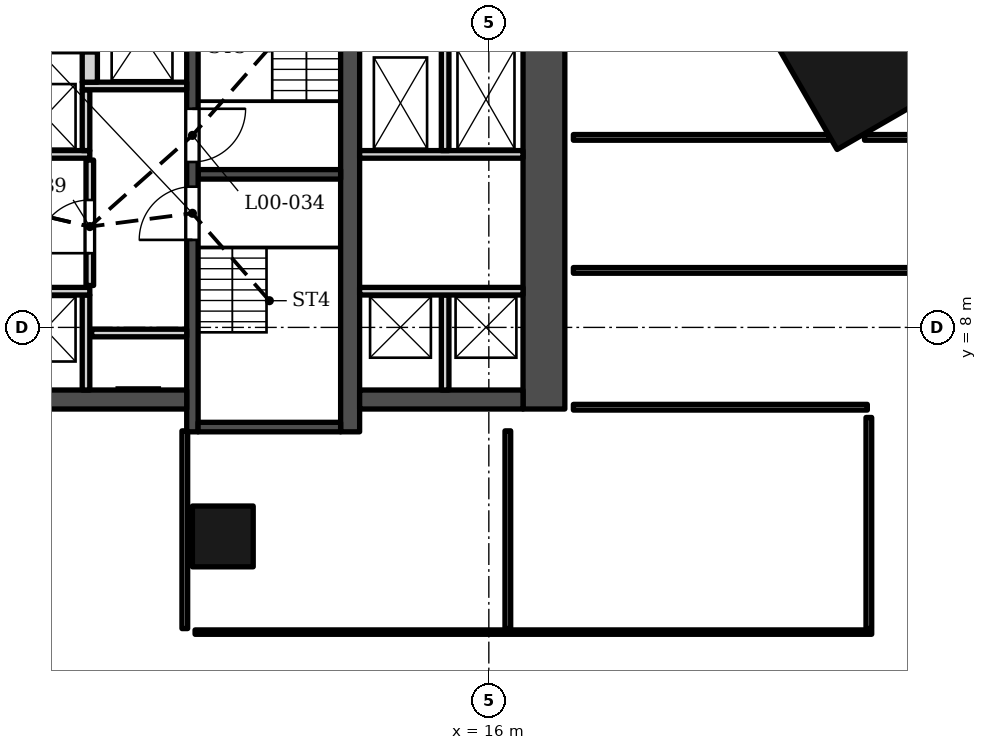
"""IFC4 building model, lengths in metres.
Left out: names, types, materials, properties, quantities, classifications, styles, units other than length and angle.
Written with IfcOpenShell. Run it as: python <this file> out.ifc"""

import sys

from ifc_helpers import new_model, si_unit, direction, frame, frame_2d, origin, origin_2d, place, context, subcontext, project, spatial, rectangle, extrude, element, fill, save


model = new_model("IFC4")
c1 = context("Model", 3, precision=1e-05, world=origin(), true_north=direction((0.0, 1.0)))
c2 = subcontext(c1, "Body", "Model", "MODEL_VIEW")
j1 = project(units=[si_unit("LENGTHUNIT", "METRE"), si_unit("PLANEANGLEUNIT", "RADIAN")], contexts=[c1])
p1 = place(None, origin())
s1 = spatial("IfcSite", under=j1, at=p1, CompositionType="ELEMENT")
p2 = place(p1, origin())
s2 = spatial("IfcBuilding", under=s1, at=p2, CompositionType="ELEMENT")
p3 = place(p2, origin())
s3 = spatial("IfcBuildingStorey", under=s2, at=p3, CompositionType="ELEMENT", Elevation=0.0)
p4 = place(p3, frame((25.75, 14.867, 0.0), z_axis=(0.0, 0.0, 1.0), x_axis=(-0.866025386331, -0.50000003023, 0.0)))
e1 = element("IfcColumn", 1, at=p4, inside=s3, PredefinedType="COLUMN", context=c2, shape_type="SweptSolid", body=[
    extrude(rectangle(XDim=3.2, YDim=3.2, at=origin_2d()), origin(), (0.0, 0.0, 1.0), 9.0),
])
p5 = place(p3, frame((9.0, 2.5, 0.0), z_axis=(0.0, 0.0, 1.0), x_axis=(1.0, 0.0, 0.0)))
e2 = element("IfcColumn", 2, at=p5, inside=s3, PredefinedType="COLUMN", context=c2, shape_type="SweptSolid", body=[
    extrude(rectangle(XDim=1.6, YDim=1.6, at=origin_2d()), origin(), (0.0, 0.0, 1.0), 9.0),
])
p6 = place(p3, frame((12.35, 5.253, 0.0), z_axis=(0.0, 0.0, 1.0), x_axis=(0.0, 1.0, 0.0)))
e3 = element("IfcWall", 3, at=p6, inside=s3, PredefinedType="SHEAR", context=c2, shape_type="SweptSolid", body=[
    extrude(rectangle(XDim=13.3, YDim=0.5, at=frame_2d((6.65, 0.0))), origin(), (0.0, 0.0, 1.0), 9.0),
])
p7 = place(p3, frame((8.2, 5.253, 0.0), z_axis=(0.0, 0.0, 1.0), x_axis=(0.0, 1.0, 0.0)))
e4 = element("IfcWall", 4, at=p7, inside=s3, PredefinedType="SHEAR", context=c2, shape_type="SweptSolid", body=[
    extrude(rectangle(XDim=13.3, YDim=0.3, at=frame_2d((6.65, 0.0))), origin(), (0.0, 0.0, 1.0), 9.0),
])
p8 = place(p7, frame((7.1, 0.0, 0.0)))
e5 = element("IfcOpeningElement", 5, at=p8, cuts=e4, PredefinedType="OPENING", context=c2, shape_type="SweptSolid", body=[
    extrude(rectangle(XDim=1.4, YDim=2.1, at=frame_2d((0.7, 1.05))), frame((0.0, 0.16, 0.0), z_axis=(0.0, -1.0, 0.0), x_axis=(1.0, 0.0, 0.0)), (0.0, 0.0, 1.0), 0.32),
])
p9 = place(p7, frame((5.05, 0.0, 0.0)))
e6 = element("IfcOpeningElement", 6, at=p9, cuts=e4, PredefinedType="OPENING", context=c2, shape_type="SweptSolid", body=[
    extrude(rectangle(XDim=1.4, YDim=2.1, at=frame_2d((0.7, 1.05))), frame((0.0, 0.16, 0.0), z_axis=(0.0, -1.0, 0.0), x_axis=(1.0, 0.0, 0.0)), (0.0, 0.0, 1.0), 0.32),
])
for number, where, z_axis, x_axis in (
    (7, (8.35, 12.028, 0.0), (0.0, 0.0, 1.0), (1.0, 0.0, 0.0)),
    (8, (8.35, 5.378, 0.0), (0.0, 0.0, 1.0), (1.0, 0.0, 0.0)),
):
    element("IfcWall", number, at=place(p3, frame(where, z_axis=z_axis, x_axis=x_axis)), inside=s3, PredefinedType="SHEAR", context=c2, shape_type="SweptSolid", body=[
        extrude(rectangle(XDim=3.75, YDim=0.25, at=frame_2d((1.875, 0.0))), origin(), (0.0, 0.0, 1.0), 9.0),
    ])
p10 = place(p3, frame((1.0, 6.103, 0.0), z_axis=(0.0, 0.0, 1.0), x_axis=(1.0, 0.0, 0.0)))
e9 = element("IfcWall", 9, at=p10, inside=s3, PredefinedType="SHEAR", context=c2, shape_type="SweptSolid", body=[
    extrude(rectangle(XDim=7.05, YDim=0.5, at=frame_2d((3.525, 0.0))), origin(), (0.0, 0.0, 1.0), 9.0),
])
p11 = place(p10, frame((5.325, 0.0, 0.0)))
e10 = element("IfcOpeningElement", 10, at=p11, cuts=e9, PredefinedType="OPENING", context=c2, shape_type="SweptSolid", body=[
    extrude(rectangle(XDim=0.9, YDim=2.1, at=frame_2d((0.45, 1.05))), frame((0.0, 0.26, 0.0), z_axis=(0.0, -1.0, 0.0), x_axis=(1.0, 0.0, 0.0)), (0.0, 0.0, 1.0), 0.52),
])
p12 = place(p3, frame((12.6, 6.103, 0.0), z_axis=(0.0, 0.0, 1.0), x_axis=(1.0, 0.0, 0.0)))
e11 = element("IfcWall", 11, at=p12, inside=s3, PredefinedType="SHEAR", context=c2, shape_type="SweptSolid", body=[
    extrude(rectangle(XDim=4.3, YDim=0.5, at=frame_2d((2.15, 0.0))), origin(), (0.0, 0.0, 1.0), 9.0),
])
p13 = place(p3, frame((17.45, 5.853, 0.0), z_axis=(0.0, 0.0, 1.0), x_axis=(0.0, 1.0, 0.0)))
e12 = element("IfcWall", 12, at=p13, inside=s3, PredefinedType="SHEAR", context=c2, shape_type="SweptSolid", body=[
    extrude(rectangle(XDim=13.2, YDim=1.1, at=frame_2d((6.6, 0.0))), origin(), (0.0, 0.0, 1.0), 9.0),
])
p14 = place(p13, frame((4.1, 0.0, 0.0)))
e13 = element("IfcOpeningElement", 13, at=p14, cuts=e12, PredefinedType="OPENING", context=c2, shape_type="SweptSolid", body=[
    extrude(rectangle(XDim=1.6, YDim=2.1, at=frame_2d((0.8, 1.05))), frame((0.0, 0.56, 0.0), z_axis=(0.0, -1.0, 0.0), x_axis=(1.0, 0.0, 0.0)), (0.0, 0.0, 1.0), 1.12),
])
p15 = place(p13, frame((10.15, 0.0, 0.0)))
e14 = element("IfcOpeningElement", 14, at=p15, cuts=e12, PredefinedType="OPENING", context=c2, shape_type="SweptSolid", body=[
    extrude(rectangle(XDim=0.9, YDim=2.1, at=frame_2d((0.45, 1.05))), frame((0.0, 0.56, 0.0), z_axis=(0.0, -1.0, 0.0), x_axis=(1.0, 0.0, 0.0)), (0.0, 0.0, 1.0), 1.12),
])
for number, where, z_axis, x_axis in (
    (15, (5.4, 6.353, 0.0), (0.0, 0.0, 1.0), (0.0, 1.0, 0.0)),
    (16, (14.85, 6.353, 0.0), (0.0, 0.0, 1.0), (0.0, 1.0, 0.0)),
    (17, (5.55, 7.853, 0.0), (0.0, 0.0, 1.0), (1.0, 0.0, 0.0)),
):
    element("IfcWall", number, at=place(p3, frame(where, z_axis=z_axis, x_axis=x_axis)), inside=s3, PredefinedType="SOLIDWALL", context=c2, shape_type="SweptSolid", body=[
        extrude(rectangle(XDim=2.5, YDim=0.2, at=frame_2d((1.25, 0.0))), origin(), (0.0, 0.0, 1.0), 8.5),
    ])
p16 = place(p3, frame((1.0, 8.953, 0.0), z_axis=(0.0, 0.0, 1.0), x_axis=(1.0, 0.0, 0.0)))
e18 = element("IfcWall", 18, at=p16, inside=s3, PredefinedType="SOLIDWALL", context=c2, shape_type="SweptSolid", body=[
    extrude(rectangle(XDim=4.5, YDim=0.2, at=frame_2d((2.25, 0.0))), origin(), (0.0, 0.0, 1.0), 8.5),
])
p17 = place(p16, frame((0.625, 0.0, 0.0)))
e19 = element("IfcOpeningElement", 19, at=p17, cuts=e18, PredefinedType="OPENING", context=c2, shape_type="SweptSolid", body=[
    extrude(rectangle(XDim=1.1, YDim=2.1, at=frame_2d((0.55, 1.05))), frame((0.0, 0.11, 0.0), z_axis=(0.0, -1.0, 0.0), x_axis=(1.0, 0.0, 0.0)), (0.0, 0.0, 1.0), 0.22),
])
p18 = place(p16, frame((2.775, 0.0, 0.0)))
e20 = element("IfcOpeningElement", 20, at=p18, cuts=e18, PredefinedType="OPENING", context=c2, shape_type="SweptSolid", body=[
    extrude(rectangle(XDim=1.1, YDim=2.1, at=frame_2d((0.55, 1.05))), frame((0.0, 0.11, 0.0), z_axis=(0.0, -1.0, 0.0), x_axis=(1.0, 0.0, 0.0)), (0.0, 0.0, 1.0), 0.22),
])
p19 = place(p3, frame((12.6, 8.953, 0.0), z_axis=(0.0, 0.0, 1.0), x_axis=(1.0, 0.0, 0.0)))
e21 = element("IfcWall", 21, at=p19, inside=s3, PredefinedType="SOLIDWALL", context=c2, shape_type="SweptSolid", body=[
    extrude(rectangle(XDim=4.3, YDim=0.2, at=frame_2d((2.15, 0.0))), origin(), (0.0, 0.0, 1.0), 8.5),
])
p20 = place(p19, frame((0.525, 0.0, 0.0)))
e22 = element("IfcOpeningElement", 22, at=p20, cuts=e21, PredefinedType="OPENING", context=c2, shape_type="SweptSolid", body=[
    extrude(rectangle(XDim=1.1, YDim=2.1, at=frame_2d((0.55, 1.05))), frame((0.0, 0.11, 0.0), z_axis=(0.0, -1.0, 0.0), x_axis=(1.0, 0.0, 0.0)), (0.0, 0.0, 1.0), 0.22),
])
p21 = place(p19, frame((2.775, 0.0, 0.0)))
e23 = element("IfcOpeningElement", 23, at=p21, cuts=e21, PredefinedType="OPENING", context=c2, shape_type="SweptSolid", body=[
    extrude(rectangle(XDim=1.1, YDim=2.1, at=frame_2d((0.55, 1.05))), frame((0.0, 0.11, 0.0), z_axis=(0.0, -1.0, 0.0), x_axis=(1.0, 0.0, 0.0)), (0.0, 0.0, 1.0), 0.22),
])
p22 = place(p3, frame((5.5, 9.103, 0.0), z_axis=(0.0, 0.0, 1.0), x_axis=(0.0, 1.0, 0.0)))
e24 = element("IfcWall", 24, at=p22, inside=s3, PredefinedType="SOLIDWALL", context=c2, shape_type="SweptSolid", body=[
    extrude(rectangle(XDim=3.3, YDim=0.2, at=frame_2d((1.65, 0.0))), origin(), (0.0, 0.0, 1.0), 8.5),
])
p23 = place(p22, frame((0.85, 0.0, 0.0)))
e25 = element("IfcOpeningElement", 25, at=p23, cuts=e24, PredefinedType="OPENING", context=c2, shape_type="SweptSolid", body=[
    extrude(rectangle(XDim=1.4, YDim=2.1, at=frame_2d((0.7, 1.05))), frame((0.0, 0.11, 0.0), z_axis=(0.0, -1.0, 0.0), x_axis=(1.0, 0.0, 0.0)), (0.0, 0.0, 1.0), 0.22),
])
p24 = place(p3, frame((-1.5, 12.552, 0.0), z_axis=(0.0, 0.0, 1.0), x_axis=(1.0, 0.0, 0.0)))
e26 = element("IfcWall", 26, at=p24, inside=s3, PredefinedType="SOLIDWALL", context=c2, shape_type="SweptSolid", body=[
    extrude(rectangle(XDim=7.0, YDim=0.2, at=frame_2d((3.5, 0.0))), origin(), (0.0, 0.0, 1.0), 8.5),
])
p25 = place(p24, frame((0.6, 0.0, 0.0)))
e27 = element("IfcOpeningElement", 27, at=p25, cuts=e26, PredefinedType="OPENING", context=c2, shape_type="SweptSolid", body=[
    extrude(rectangle(XDim=1.4, YDim=2.4, at=frame_2d((0.7, 1.2))), frame((0.0, 0.11, 0.0), z_axis=(0.0, -1.0, 0.0), x_axis=(1.0, 0.0, 0.0)), (0.0, 0.0, 1.0), 0.22),
])
p26 = place(p24, frame((3.075, 0.0, 0.0)))
e28 = element("IfcOpeningElement", 28, at=p26, cuts=e26, PredefinedType="OPENING", context=c2, shape_type="SweptSolid", body=[
    extrude(rectangle(XDim=1.1, YDim=2.1, at=frame_2d((0.55, 1.05))), frame((0.0, 0.11, 0.0), z_axis=(0.0, -1.0, 0.0), x_axis=(1.0, 0.0, 0.0)), (0.0, 0.0, 1.0), 0.22),
])
p27 = place(p24, frame((5.275, 0.0, 0.0)))
e29 = element("IfcOpeningElement", 29, at=p27, cuts=e26, PredefinedType="OPENING", context=c2, shape_type="SweptSolid", body=[
    extrude(rectangle(XDim=1.1, YDim=2.1, at=frame_2d((0.55, 1.05))), frame((0.0, 0.11, 0.0), z_axis=(0.0, -1.0, 0.0), x_axis=(1.0, 0.0, 0.0)), (0.0, 0.0, 1.0), 0.22),
])
p28 = place(p3, frame((12.6, 12.552, 0.0), z_axis=(0.0, 0.0, 1.0), x_axis=(1.0, 0.0, 0.0)))
e30 = element("IfcWall", 30, at=p28, inside=s3, PredefinedType="SOLIDWALL", context=c2, shape_type="SweptSolid", body=[
    extrude(rectangle(XDim=4.3, YDim=0.2, at=frame_2d((2.15, 0.0))), origin(), (0.0, 0.0, 1.0), 8.5),
])
p29 = place(p28, frame((0.475, 0.0, 0.0)))
e31 = element("IfcOpeningElement", 31, at=p29, cuts=e30, PredefinedType="OPENING", context=c2, shape_type="SweptSolid", body=[
    extrude(rectangle(XDim=1.2, YDim=2.1, at=frame_2d((0.6, 1.05))), frame((0.0, 0.11, 0.0), z_axis=(0.0, -1.0, 0.0), x_axis=(1.0, 0.0, 0.0)), (0.0, 0.0, 1.0), 0.22),
])
p30 = place(p28, frame((2.625, 0.0, 0.0)))
e32 = element("IfcOpeningElement", 32, at=p30, cuts=e30, PredefinedType="OPENING", context=c2, shape_type="SweptSolid", body=[
    extrude(rectangle(XDim=1.4, YDim=2.1, at=frame_2d((0.7, 1.05))), frame((0.0, 0.11, 0.0), z_axis=(0.0, -1.0, 0.0), x_axis=(1.0, 0.0, 0.0)), (0.0, 0.0, 1.0), 0.22),
])
p31 = place(p3, frame((5.4, 12.653, 0.0), z_axis=(0.0, 0.0, 1.0), x_axis=(0.0, 1.0, 0.0)))
e33 = element("IfcWall", 33, at=p31, inside=s3, PredefinedType="SOLIDWALL", context=c2, shape_type="SweptSolid", body=[
    extrude(rectangle(XDim=1.6, YDim=0.2, at=frame_2d((0.8, 0.0))), origin(), (0.0, 0.0, 1.0), 8.5),
])
p32 = place(p3, frame((14.85, 12.653, 0.0), z_axis=(0.0, 0.0, 1.0), x_axis=(0.0, 1.0, 0.0)))
e34 = element("IfcWall", 34, at=p32, inside=s3, PredefinedType="SOLIDWALL", context=c2, shape_type="SweptSolid", body=[
    extrude(rectangle(XDim=3.0, YDim=0.2, at=frame_2d((1.5, 0.0))), origin(), (0.0, 0.0, 1.0), 8.5),
])
p33 = place(p3, frame((5.3, 14.353, 0.0), z_axis=(0.0, 0.0, 1.0), x_axis=(1.0, 0.0, 0.0)))
e35 = element("IfcWall", 35, at=p33, inside=s3, PredefinedType="SOLIDWALL", context=c2, shape_type="SweptSolid", body=[
    extrude(rectangle(XDim=2.75, YDim=0.2, at=frame_2d((1.375, 0.0))), origin(), (0.0, 0.0, 1.0), 8.5),
])
p34 = place(p33, frame((0.975, 0.0, 0.0)))
e36 = element("IfcOpeningElement", 36, at=p34, cuts=e35, PredefinedType="OPENING", context=c2, shape_type="SweptSolid", body=[
    extrude(rectangle(XDim=1.2, YDim=2.1, at=frame_2d((0.6, 1.05))), frame((0.0, 0.11, 0.0), z_axis=(0.0, -1.0, 0.0), x_axis=(1.0, 0.0, 0.0)), (0.0, 0.0, 1.0), 0.22),
])
p35 = place(p3, frame((5.5, 14.453, 0.0), z_axis=(0.0, 0.0, 1.0), x_axis=(0.0, 1.0, 0.0)))
e37 = element("IfcWall", 37, at=p35, inside=s3, PredefinedType="SOLIDWALL", context=c2, shape_type="SweptSolid", body=[
    extrude(rectangle(XDim=0.8, YDim=0.4, at=frame_2d((0.4, 0.0))), origin(), (0.0, 0.0, 1.0), 8.5),
])
p36 = place(p3, frame((-1.5, 15.353, 0.0), z_axis=(0.0, 0.0, 1.0), x_axis=(1.0, 0.0, 0.0)))
e38 = element("IfcWall", 38, at=p36, inside=s3, PredefinedType="SOLIDWALL", context=c2, shape_type="SweptSolid", body=[
    extrude(rectangle(XDim=7.2, YDim=0.2, at=frame_2d((3.6, 0.0))), origin(), (0.0, 0.0, 1.0), 8.5),
])
p37 = place(p3, frame((8.27, -0.018, 0.0), z_axis=(0.0, 0.0, 1.0), x_axis=(1.0, 0.0, 0.0)))
e39 = element("IfcWall", 39, at=p37, inside=s3, PredefinedType="PARTITIONING", context=c2, shape_type="SweptSolid", body=[
    extrude(rectangle(XDim=17.805, YDim=0.115, at=frame_2d((8.902, 0.0))), origin(), (0.0, 0.0, 1.0), 7.3),
])
p38 = place(p37, frame((3.33, 0.0, 0.0)))
e40 = element("IfcOpeningElement", 40, at=p38, cuts=e39, PredefinedType="OPENING", context=c2, shape_type="SweptSolid", body=[
    extrude(rectangle(XDim=1.1, YDim=2.1, at=frame_2d((0.55, 1.05))), frame((0.0, 0.067, 0.0), z_axis=(0.0, -1.0, 0.0), x_axis=(1.0, 0.0, 0.0)), (0.0, 0.0, 1.0), 0.135),
])
p39 = place(p37, frame((12.58, 0.0, 0.0)))
e41 = element("IfcOpeningElement", 41, at=p39, cuts=e39, PredefinedType="OPENING", context=c2, shape_type="SweptSolid", body=[
    extrude(rectangle(XDim=1.0, YDim=2.1, at=frame_2d((0.5, 1.05))), frame((0.0, 0.067, 0.0), z_axis=(0.0, -1.0, 0.0), x_axis=(1.0, 0.0, 0.0)), (0.0, 0.0, 1.0), 0.135),
])
for number, where, z_axis, x_axis in (
    (42, (8.0, 0.075, 0.0), (0.0, 0.0, 1.0), (0.0, 1.0, 0.0)),
    (43, (16.5, 0.075, 0.0), (0.0, 0.0, 1.0), (0.0, 1.0, 0.0)),
):
    element("IfcWall", number, at=place(p3, frame(where, z_axis=z_axis, x_axis=x_axis)), inside=s3, PredefinedType="PARTITIONING", context=c2, shape_type="SweptSolid", body=[
        extrude(rectangle(XDim=5.203, YDim=0.15, at=frame_2d((2.602, 0.0))), origin(), (0.0, 0.0, 1.0), 8.5),
    ])
p40 = place(p3, frame((26.0, 0.075, 0.0), z_axis=(0.0, 0.0, 1.0), x_axis=(0.0, 1.0, 0.0)))
e44 = element("IfcWall", 44, at=p40, inside=s3, PredefinedType="PARTITIONING", context=c2, shape_type="SweptSolid", body=[
    extrude(rectangle(XDim=5.555, YDim=0.15, at=frame_2d((2.777, 0.0))), origin(), (0.0, 0.0, 1.0), 8.5),
])
p41 = place(p3, frame((18.225, 5.9, 0.0), z_axis=(0.0, 0.0, 1.0), x_axis=(1.0, 0.0, 0.0)))
e45 = element("IfcWall", 45, at=p41, inside=s3, PredefinedType="PARTITIONING", context=c2, shape_type="SweptSolid", body=[
    extrude(rectangle(XDim=7.735, YDim=0.15, at=frame_2d((3.867, 0.0))), origin(), (0.0, 0.0, 1.0), 7.6),
])
p42 = place(p3, frame((18.225, 9.5, 0.0), z_axis=(0.0, 0.0, 1.0), x_axis=(1.0, 0.0, 0.0)))
e46 = element("IfcWall", 46, at=p42, inside=s3, PredefinedType="PARTITIONING", context=c2, shape_type="SweptSolid", body=[
    extrude(rectangle(XDim=15.3, YDim=0.15, at=frame_2d((7.65, 0.0))), origin(), (0.0, 0.0, 1.0), 7.3),
])
p43 = place(p3, frame((18.225, 13.0, 0.0), z_axis=(0.0, 0.0, 1.0), x_axis=(1.0, 0.0, 0.0)))
e47 = element("IfcWall", 47, at=p43, inside=s3, PredefinedType="PARTITIONING", context=c2, shape_type="SweptSolid", body=[
    extrude(rectangle(XDim=6.732, YDim=0.15, at=frame_2d((3.366, 0.0))), origin(), (0.0, 0.0, 1.0), 7.6),
])
p44 = place(p43, frame((3.575, 0.0, 0.0)))
e48 = element("IfcOpeningElement", 48, at=p44, cuts=e47, PredefinedType="OPENING", context=c2, shape_type="SweptSolid", body=[
    extrude(rectangle(XDim=1.2, YDim=2.1, at=frame_2d((0.6, 1.05))), frame((0.0, 0.085, 0.0), z_axis=(0.0, -1.0, 0.0), x_axis=(1.0, 0.0, 0.0)), (0.0, 0.0, 1.0), 0.17),
])
p45 = place(p3, frame((25.886, 13.0, 0.0), z_axis=(0.0, 0.0, 1.0), x_axis=(1.0, 0.0, 0.0)))
e49 = element("IfcWall", 49, at=p45, inside=s3, PredefinedType="PARTITIONING", context=c2, shape_type="SweptSolid", body=[
    extrude(rectangle(XDim=7.639, YDim=0.15, at=frame_2d((3.819, 0.0))), origin(), (0.0, 0.0, 1.0), 7.3),
])
p46 = place(p18, origin())
e50 = element("IfcDoor", 50, at=p46, inside=s3, OperationType="DOUBLE_DOOR_SLIDING", PredefinedType="DOOR", context=c2, shape_type="SweptSolid", body=[
    extrude(rectangle(XDim=1.1, YDim=2.1, at=frame_2d((0.55, 1.05))), frame((0.0, 0.025, 0.0), z_axis=(0.0, -1.0, 0.0), x_axis=(1.0, 0.0, 0.0)), (0.0, 0.0, 1.0), 0.05),
])
fill(e20, e50)
p47 = place(p27, origin())
e51 = element("IfcDoor", 51, at=p47, inside=s3, OperationType="DOUBLE_DOOR_SLIDING", PredefinedType="DOOR", context=c2, shape_type="SweptSolid", body=[
    extrude(rectangle(XDim=1.1, YDim=2.1, at=frame_2d((0.55, 1.05))), frame((0.0, 0.025, 0.0), z_axis=(0.0, -1.0, 0.0), x_axis=(1.0, 0.0, 0.0)), (0.0, 0.0, 1.0), 0.05),
])
fill(e29, e51)
p48 = place(p34, origin())
e52 = element("IfcDoor", 52, at=p48, inside=s3, OperationType="DOUBLE_DOOR_SLIDING", PredefinedType="DOOR", context=c2, shape_type="SweptSolid", body=[
    extrude(rectangle(XDim=1.2, YDim=2.1, at=frame_2d((0.6, 1.05))), frame((0.0, 0.025, 0.0), z_axis=(0.0, -1.0, 0.0), x_axis=(1.0, 0.0, 0.0)), (0.0, 0.0, 1.0), 0.05),
])
fill(e36, e52)
p49 = place(p20, origin())
e53 = element("IfcDoor", 53, at=p49, inside=s3, OperationType="DOUBLE_DOOR_SLIDING", PredefinedType="DOOR", context=c2, shape_type="SweptSolid", body=[
    extrude(rectangle(XDim=1.1, YDim=2.1, at=frame_2d((0.55, 1.05))), frame((0.0, 0.025, 0.0), z_axis=(0.0, -1.0, 0.0), x_axis=(1.0, 0.0, 0.0)), (0.0, 0.0, 1.0), 0.05),
])
fill(e22, e53)
p50 = place(p21, origin())
e54 = element("IfcDoor", 54, at=p50, inside=s3, OperationType="DOUBLE_DOOR_SLIDING", PredefinedType="DOOR", context=c2, shape_type="SweptSolid", body=[
    extrude(rectangle(XDim=1.1, YDim=2.1, at=frame_2d((0.55, 1.05))), frame((0.0, 0.025, 0.0), z_axis=(0.0, -1.0, 0.0), x_axis=(1.0, 0.0, 0.0)), (0.0, 0.0, 1.0), 0.05),
])
fill(e23, e54)
p51 = place(p29, origin())
e55 = element("IfcDoor", 55, at=p51, inside=s3, OperationType="DOUBLE_DOOR_SLIDING", PredefinedType="DOOR", context=c2, shape_type="SweptSolid", body=[
    extrude(rectangle(XDim=1.2, YDim=2.1, at=frame_2d((0.6, 1.05))), frame((0.0, 0.025, 0.0), z_axis=(0.0, -1.0, 0.0), x_axis=(1.0, 0.0, 0.0)), (0.0, 0.0, 1.0), 0.05),
])
fill(e31, e55)
p52 = place(p30, origin())
e56 = element("IfcDoor", 56, at=p52, inside=s3, OperationType="DOUBLE_DOOR_SLIDING", PredefinedType="DOOR", context=c2, shape_type="SweptSolid", body=[
    extrude(rectangle(XDim=1.4, YDim=2.1, at=frame_2d((0.7, 1.05))), frame((0.0, 0.025, 0.0), z_axis=(0.0, -1.0, 0.0), x_axis=(1.0, 0.0, 0.0)), (0.0, 0.0, 1.0), 0.05),
])
fill(e32, e56)
p53 = place(p8, origin())
e57 = element("IfcDoor", 57, at=p53, inside=s3, OperationType="SINGLE_SWING_RIGHT", PredefinedType="DOOR", context=c2, shape_type="SweptSolid", body=[
    extrude(rectangle(XDim=1.4, YDim=2.1, at=frame_2d((0.7, 1.05))), frame((0.0, 0.025, 0.0), z_axis=(0.0, -1.0, 0.0), x_axis=(1.0, 0.0, 0.0)), (0.0, 0.0, 1.0), 0.05),
])
fill(e5, e57)
p54 = place(p9, origin())
e58 = element("IfcDoor", 58, at=p54, inside=s3, OperationType="SINGLE_SWING_LEFT", PredefinedType="DOOR", context=c2, shape_type="SweptSolid", body=[
    extrude(rectangle(XDim=1.4, YDim=2.1, at=frame_2d((0.7, 1.05))), frame((0.0, 0.025, 0.0), z_axis=(0.0, -1.0, 0.0), x_axis=(1.0, 0.0, 0.0)), (0.0, 0.0, 1.0), 0.05),
])
fill(e6, e58)
p55 = place(p23, origin())
e59 = element("IfcDoor", 59, at=p55, inside=s3, OperationType="SINGLE_SWING_LEFT", PredefinedType="DOOR", context=c2, shape_type="SweptSolid", body=[
    extrude(rectangle(XDim=1.4, YDim=2.1, at=frame_2d((0.7, 1.05))), frame((0.0, 0.025, 0.0), z_axis=(0.0, -1.0, 0.0), x_axis=(1.0, 0.0, 0.0)), (0.0, 0.0, 1.0), 0.05),
])
fill(e25, e59)
p56 = place(p11, origin())
e60 = element("IfcDoor", 60, at=p56, inside=s3, OperationType="SINGLE_SWING_RIGHT", PredefinedType="DOOR", context=c2, shape_type="SweptSolid", body=[
    extrude(rectangle(XDim=0.9, YDim=2.1, at=frame_2d((0.45, 1.05))), frame((0.0, 0.025, 0.0), z_axis=(0.0, -1.0, 0.0), x_axis=(1.0, 0.0, 0.0)), (0.0, 0.0, 1.0), 0.05),
])
fill(e10, e60)
p57 = place(p14, origin())
e61 = element("IfcDoor", 61, at=p57, inside=s3, OperationType="DOUBLE_DOOR_SINGLE_SWING", PredefinedType="DOOR", context=c2, shape_type="SweptSolid", body=[
    extrude(rectangle(XDim=1.6, YDim=2.1, at=frame_2d((0.8, 1.05))), frame((0.0, 0.275, 0.0), z_axis=(0.0, -1.0, 0.0), x_axis=(1.0, 0.0, 0.0)), (0.0, 0.0, 1.0), 0.05),
])
fill(e13, e61)
p58 = place(p38, origin())
e62 = element("IfcDoor", 62, at=p58, inside=s3, OperationType="SINGLE_SWING_RIGHT", PredefinedType="DOOR", context=c2, shape_type="SweptSolid", body=[
    extrude(rectangle(XDim=1.1, YDim=2.1, at=frame_2d((0.55, 1.05))), frame((0.0, 0.025, 0.0), z_axis=(0.0, -1.0, 0.0), x_axis=(1.0, 0.0, 0.0)), (0.0, 0.0, 1.0), 0.05),
])
fill(e40, e62)
p59 = place(p39, origin())
e63 = element("IfcDoor", 63, at=p59, inside=s3, OperationType="SINGLE_SWING_RIGHT", PredefinedType="DOOR", context=c2, shape_type="SweptSolid", body=[
    extrude(rectangle(XDim=1.0, YDim=2.1, at=frame_2d((0.5, 1.05))), frame((0.0, 0.025, 0.0), z_axis=(0.0, -1.0, 0.0), x_axis=(1.0, 0.0, 0.0)), (0.0, 0.0, 1.0), 0.05),
])
fill(e41, e63)
p60 = place(p44, origin())
e64 = element("IfcDoor", 64, at=p60, inside=s3, OperationType="SINGLE_SWING_LEFT", PredefinedType="DOOR", context=c2, shape_type="SweptSolid", body=[
    extrude(rectangle(XDim=1.2, YDim=2.1, at=frame_2d((0.6, 1.05))), frame((0.0, 0.025, 0.0), z_axis=(0.0, -1.0, 0.0), x_axis=(1.0, 0.0, 0.0)), (0.0, 0.0, 1.0), 0.05),
])
fill(e48, e64)
save(model, sys.argv[1])
